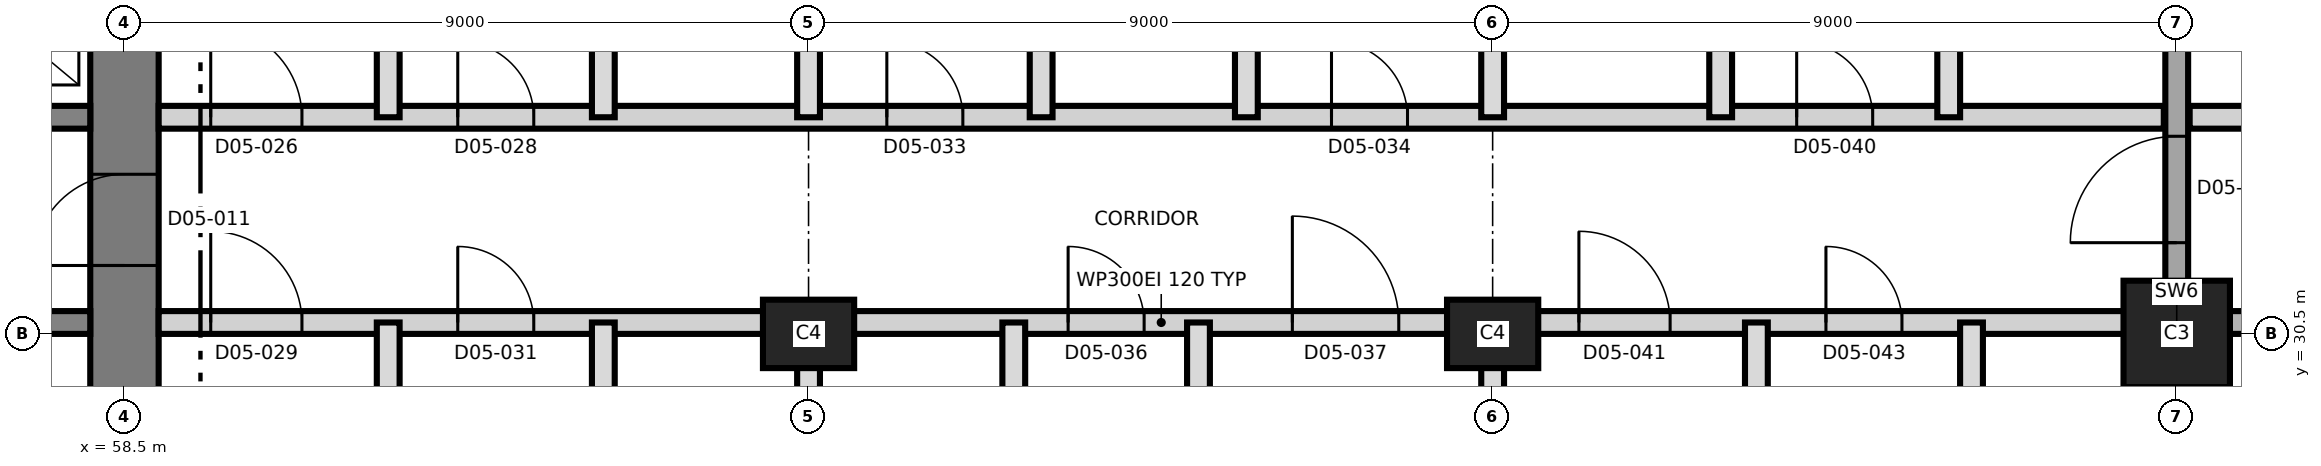
"""IFC4 building model, lengths in metres.
Left out: names, types, materials, properties, quantities, classifications, styles, units other than length and angle.
Written with IfcOpenShell. Run it as: python <this file> out.ifc"""

import sys

from ifc_helpers import new_model, si_unit, direction, frame, frame_2d, origin, origin_2d, place, context, subcontext, project, spatial, rectangle, extrude, element, fill, save


model = new_model("IFC4")
c1 = context("Model", 3, precision=1e-05, world=origin(), true_north=direction((0.0, 1.0)))
c2 = subcontext(c1, "Body", "Model", "MODEL_VIEW")
j1 = project(units=[si_unit("LENGTHUNIT", "METRE"), si_unit("PLANEANGLEUNIT", "RADIAN")], contexts=[c1])
p1 = place(None, origin())
s1 = spatial("IfcSite", under=j1, at=p1, CompositionType="ELEMENT")
p2 = place(p1, origin())
s2 = spatial("IfcBuilding", under=s1, at=p2, CompositionType="ELEMENT")
p3 = place(p2, frame((0.0, 0.0, 74.2)))
s3 = spatial("IfcBuildingStorey", under=s2, at=p3, CompositionType="ELEMENT", Elevation=74.2)
p4 = place(p3, frame((58.5, 21.05, 0.0), z_axis=(0.0, 0.0, 1.0), x_axis=(0.0, 1.0, 0.0)))
e1 = element("IfcWall", 1, at=p4, inside=s3, PredefinedType="SHEAR", context=c2, shape_type="SweptSolid", body=[
    extrude(rectangle(XDim=18.9, YDim=0.9, at=frame_2d((9.45, 0.0))), origin(), (0.0, 0.0, 1.0), 3.7),
])
p5 = place(p4, frame((10.35, 0.0, 0.0)))
e2 = element("IfcOpeningElement", 2, at=p5, cuts=e1, PredefinedType="OPENING", context=c2, shape_type="SweptSolid", body=[
    extrude(rectangle(XDim=1.2, YDim=2.1, at=frame_2d((0.6, 1.05))), frame((0.0, 0.46, 0.0), z_axis=(0.0, -1.0, 0.0), x_axis=(1.0, 0.0, 0.0)), (0.0, 0.0, 1.0), 0.92),
])
p6 = place(p3, frame((31.95, 30.65, 0.0), z_axis=(0.0, 0.0, 1.0), x_axis=(1.0, 0.0, 0.0)))
e3 = element("IfcWall", 3, at=p6, inside=s3, PredefinedType="SHEAR", context=c2, shape_type="SweptSolid", body=[
    extrude(rectangle(XDim=26.1, YDim=0.3, at=frame_2d((13.05, 0.0))), origin(), (0.0, 0.0, 1.0), 3.7),
])
p7 = place(p6, frame((24.55, 0.0, 0.0)))
e4 = element("IfcOpeningElement", 4, at=p7, cuts=e3, PredefinedType="OPENING", context=c2, shape_type="SweptSolid", body=[
    extrude(rectangle(XDim=1.0, YDim=2.1, at=frame_2d((0.5, 1.05))), frame((0.0, 0.16, 0.0), z_axis=(0.0, -1.0, 0.0), x_axis=(1.0, 0.0, 0.0)), (0.0, 0.0, 1.0), 0.32),
])
p8 = place(p6, frame((11.35, 0.0, 0.0)))
e5 = element("IfcOpeningElement", 5, at=p8, cuts=e3, PredefinedType="OPENING", context=c2, shape_type="SweptSolid", body=[
    extrude(rectangle(XDim=1.0, YDim=2.1, at=frame_2d((0.5, 1.05))), frame((0.0, 0.16, 0.0), z_axis=(0.0, -1.0, 0.0), x_axis=(1.0, 0.0, 0.0)), (0.0, 0.0, 1.0), 0.32),
])
p9 = place(p3, frame((31.95, 33.35, 0.0), z_axis=(0.0, 0.0, 1.0), x_axis=(1.0, 0.0, 0.0)))
e6 = element("IfcWall", 6, at=p9, inside=s3, PredefinedType="SHEAR", context=c2, shape_type="SweptSolid", body=[
    extrude(rectangle(XDim=26.1, YDim=0.3, at=frame_2d((13.05, 0.0))), origin(), (0.0, 0.0, 1.0), 3.7),
])
p10 = place(p9, frame((13.7, 0.0, 0.0)))
e7 = element("IfcOpeningElement", 7, at=p10, cuts=e6, PredefinedType="OPENING", context=c2, shape_type="SweptSolid", body=[
    extrude(rectangle(XDim=1.4, YDim=2.1, at=frame_2d((0.7, 1.05))), frame((0.0, 0.16, 0.0), z_axis=(0.0, -1.0, 0.0), x_axis=(1.0, 0.0, 0.0)), (0.0, 0.0, 1.0), 0.32),
])
p11 = place(p9, frame((5.175, 0.0, 0.0)))
e8 = element("IfcOpeningElement", 8, at=p11, cuts=e6, PredefinedType="OPENING", context=c2, shape_type="SweptSolid", body=[
    extrude(rectangle(XDim=1.2, YDim=2.1, at=frame_2d((0.6, 1.05))), frame((0.0, 0.16, 0.0), z_axis=(0.0, -1.0, 0.0), x_axis=(1.0, 0.0, 0.0)), (0.0, 0.0, 1.0), 0.32),
])
p12 = place(p9, frame((19.725, 0.0, 0.0)))
e9 = element("IfcOpeningElement", 9, at=p12, cuts=e6, PredefinedType="OPENING", context=c2, shape_type="SweptSolid", body=[
    extrude(rectangle(XDim=1.2, YDim=2.1, at=frame_2d((0.6, 1.05))), frame((0.0, 0.16, 0.0), z_axis=(0.0, -1.0, 0.0), x_axis=(1.0, 0.0, 0.0)), (0.0, 0.0, 1.0), 0.32),
])
for number, where, z_axis, x_axis in (
    (10, (67.5, 30.5, 0.0), (0.0, 0.0, 1.0), (1.0, 0.0, 0.0)),
    (11, (76.5, 30.5, 0.0), (0.0, 0.0, 1.0), (1.0, 0.0, 0.0)),
):
    element("IfcColumn", number, at=place(p3, frame(where, z_axis=z_axis, x_axis=x_axis)), inside=s3, PredefinedType="COLUMN", context=c2, shape_type="SweptSolid", body=[
        extrude(rectangle(XDim=1.2, YDim=0.9, at=origin_2d()), origin(), (0.0, 0.0, 1.0), 3.7),
    ])
p13 = place(p3, frame((85.5, 30.5, 0.0), z_axis=(0.0, 0.0, 1.0), x_axis=(1.0, 0.0, 0.0)))
e12 = element("IfcColumn", 12, at=p13, inside=s3, PredefinedType="COLUMN", context=c2, shape_type="SweptSolid", body=[
    extrude(rectangle(XDim=1.4, YDim=1.4, at=origin_2d()), origin(), (0.0, 0.0, 1.0), 3.7),
])
p14 = place(p3, frame((85.5, 20.35, 0.0), z_axis=(0.0, 0.0, 1.0), x_axis=(0.0, 1.0, 0.0)))
e13 = element("IfcWall", 13, at=p14, inside=s3, PredefinedType="SHEAR", context=c2, shape_type="SweptSolid", body=[
    extrude(rectangle(XDim=20.3, YDim=0.3, at=frame_2d((10.15, 0.0))), origin(), (0.0, 0.0, 1.0), 3.7),
])
p15 = place(p14, frame((11.35, 0.0, 0.0)))
e14 = element("IfcOpeningElement", 14, at=p15, cuts=e13, PredefinedType="OPENING", context=c2, shape_type="SweptSolid", body=[
    extrude(rectangle(XDim=1.4, YDim=2.1, at=frame_2d((0.7, 1.05))), frame((0.0, 0.16, 0.0), z_axis=(0.0, -1.0, 0.0), x_axis=(1.0, 0.0, 0.0)), (0.0, 0.0, 1.0), 0.32),
])
p16 = place(p3, frame((58.95, 30.65, 0.0), z_axis=(0.0, 0.0, 1.0), x_axis=(1.0, 0.0, 0.0)))
e15 = element("IfcWall", 15, at=p16, inside=s3, PredefinedType="PARTITIONING", context=c2, shape_type="SweptSolid", body=[
    extrude(rectangle(XDim=26.38, YDim=0.3, at=frame_2d((13.19, 0.0))), origin(), (0.0, 0.0, 1.0), 3.4),
])
p17 = place(p16, frame((0.685, 0.0, 0.0)))
e16 = element("IfcOpeningElement", 16, at=p17, cuts=e15, PredefinedType="OPENING", context=c2, shape_type="SweptSolid", body=[
    extrude(rectangle(XDim=1.2, YDim=2.1, at=frame_2d((0.6, 1.05))), frame((0.0, 0.16, 0.0), z_axis=(0.0, -1.0, 0.0), x_axis=(1.0, 0.0, 0.0)), (0.0, 0.0, 1.0), 0.32),
])
p18 = place(p16, frame((3.935, 0.0, 0.0)))
e17 = element("IfcOpeningElement", 17, at=p18, cuts=e15, PredefinedType="OPENING", context=c2, shape_type="SweptSolid", body=[
    extrude(rectangle(XDim=1.0, YDim=2.1, at=frame_2d((0.5, 1.05))), frame((0.0, 0.16, 0.0), z_axis=(0.0, -1.0, 0.0), x_axis=(1.0, 0.0, 0.0)), (0.0, 0.0, 1.0), 0.32),
])
p19 = place(p16, frame((11.965, 0.0, 0.0)))
e18 = element("IfcOpeningElement", 18, at=p19, cuts=e15, PredefinedType="OPENING", context=c2, shape_type="SweptSolid", body=[
    extrude(rectangle(XDim=1.0, YDim=2.1, at=frame_2d((0.5, 1.05))), frame((0.0, 0.16, 0.0), z_axis=(0.0, -1.0, 0.0), x_axis=(1.0, 0.0, 0.0)), (0.0, 0.0, 1.0), 0.32),
])
p20 = place(p16, frame((14.915, 0.0, 0.0)))
e19 = element("IfcOpeningElement", 19, at=p20, cuts=e15, PredefinedType="OPENING", context=c2, shape_type="SweptSolid", body=[
    extrude(rectangle(XDim=1.4, YDim=2.1, at=frame_2d((0.7, 1.05))), frame((0.0, 0.16, 0.0), z_axis=(0.0, -1.0, 0.0), x_axis=(1.0, 0.0, 0.0)), (0.0, 0.0, 1.0), 0.32),
])
p21 = place(p16, frame((18.685, 0.0, 0.0)))
e20 = element("IfcOpeningElement", 20, at=p21, cuts=e15, PredefinedType="OPENING", context=c2, shape_type="SweptSolid", body=[
    extrude(rectangle(XDim=1.2, YDim=2.1, at=frame_2d((0.6, 1.05))), frame((0.0, 0.16, 0.0), z_axis=(0.0, -1.0, 0.0), x_axis=(1.0, 0.0, 0.0)), (0.0, 0.0, 1.0), 0.32),
])
p22 = place(p16, frame((21.935, 0.0, 0.0)))
e21 = element("IfcOpeningElement", 21, at=p22, cuts=e15, PredefinedType="OPENING", context=c2, shape_type="SweptSolid", body=[
    extrude(rectangle(XDim=1.0, YDim=2.1, at=frame_2d((0.5, 1.05))), frame((0.0, 0.16, 0.0), z_axis=(0.0, -1.0, 0.0), x_axis=(1.0, 0.0, 0.0)), (0.0, 0.0, 1.0), 0.32),
])
p23 = place(p3, frame((85.67, 30.65, 0.0), z_axis=(0.0, 0.0, 1.0), x_axis=(1.0, 0.0, 0.0)))
e22 = element("IfcWall", 22, at=p23, inside=s3, PredefinedType="SHEAR", context=c2, shape_type="SweptSolid", body=[
    extrude(rectangle(XDim=9.58, YDim=0.3, at=frame_2d((4.79, 0.0))), origin(), (0.0, 0.0, 1.0), 3.4),
])
p24 = place(p23, frame((2.08, 0.0, 0.0)))
e23 = element("IfcOpeningElement", 23, at=p24, cuts=e22, PredefinedType="OPENING", context=c2, shape_type="SweptSolid", body=[
    extrude(rectangle(XDim=1.2, YDim=2.1, at=frame_2d((0.6, 1.05))), frame((0.0, 0.16, 0.0), z_axis=(0.0, -1.0, 0.0), x_axis=(1.0, 0.0, 0.0)), (0.0, 0.0, 1.0), 0.32),
])
p25 = place(p23, frame((5.63, 0.0, 0.0)))
e24 = element("IfcOpeningElement", 24, at=p25, cuts=e22, PredefinedType="OPENING", context=c2, shape_type="SweptSolid", body=[
    extrude(rectangle(XDim=1.0, YDim=2.1, at=frame_2d((0.5, 1.05))), frame((0.0, 0.16, 0.0), z_axis=(0.0, -1.0, 0.0), x_axis=(1.0, 0.0, 0.0)), (0.0, 0.0, 1.0), 0.32),
])
p26 = place(p3, frame((58.95, 33.35, 0.0), z_axis=(0.0, 0.0, 1.0), x_axis=(1.0, 0.0, 0.0)))
e25 = element("IfcWall", 25, at=p26, inside=s3, PredefinedType="PARTITIONING", context=c2, shape_type="SweptSolid", body=[
    extrude(rectangle(XDim=26.38, YDim=0.3, at=frame_2d((13.19, 0.0))), origin(), (0.0, 0.0, 1.0), 3.4),
])
p27 = place(p26, frame((0.685, 0.0, 0.0)))
e26 = element("IfcOpeningElement", 26, at=p27, cuts=e25, PredefinedType="OPENING", context=c2, shape_type="SweptSolid", body=[
    extrude(rectangle(XDim=1.2, YDim=2.1, at=frame_2d((0.6, 1.05))), frame((0.0, 0.16, 0.0), z_axis=(0.0, -1.0, 0.0), x_axis=(1.0, 0.0, 0.0)), (0.0, 0.0, 1.0), 0.32),
])
p28 = place(p26, frame((3.935, 0.0, 0.0)))
e27 = element("IfcOpeningElement", 27, at=p28, cuts=e25, PredefinedType="OPENING", context=c2, shape_type="SweptSolid", body=[
    extrude(rectangle(XDim=1.0, YDim=2.1, at=frame_2d((0.5, 1.05))), frame((0.0, 0.16, 0.0), z_axis=(0.0, -1.0, 0.0), x_axis=(1.0, 0.0, 0.0)), (0.0, 0.0, 1.0), 0.32),
])
p29 = place(p26, frame((9.58, 0.0, 0.0)))
e28 = element("IfcOpeningElement", 28, at=p29, cuts=e25, PredefinedType="OPENING", context=c2, shape_type="SweptSolid", body=[
    extrude(rectangle(XDim=1.0, YDim=2.1, at=frame_2d((0.5, 1.05))), frame((0.0, 0.16, 0.0), z_axis=(0.0, -1.0, 0.0), x_axis=(1.0, 0.0, 0.0)), (0.0, 0.0, 1.0), 0.32),
])
p30 = place(p26, frame((15.43, 0.0, 0.0)))
e29 = element("IfcOpeningElement", 29, at=p30, cuts=e25, PredefinedType="OPENING", context=c2, shape_type="SweptSolid", body=[
    extrude(rectangle(XDim=1.0, YDim=2.1, at=frame_2d((0.5, 1.05))), frame((0.0, 0.16, 0.0), z_axis=(0.0, -1.0, 0.0), x_axis=(1.0, 0.0, 0.0)), (0.0, 0.0, 1.0), 0.32),
])
p31 = place(p26, frame((21.55, 0.0, 0.0)))
e30 = element("IfcOpeningElement", 30, at=p31, cuts=e25, PredefinedType="OPENING", context=c2, shape_type="SweptSolid", body=[
    extrude(rectangle(XDim=1.0, YDim=2.4, at=frame_2d((0.5, 1.2))), frame((0.0, 0.16, 0.0), z_axis=(0.0, -1.0, 0.0), x_axis=(1.0, 0.0, 0.0)), (0.0, 0.0, 1.0), 0.32),
])
p32 = place(p3, frame((85.67, 33.35, 0.0), z_axis=(0.0, 0.0, 1.0), x_axis=(1.0, 0.0, 0.0)))
e31 = element("IfcWall", 31, at=p32, inside=s3, PredefinedType="PARTITIONING", context=c2, shape_type="SweptSolid", body=[
    extrude(rectangle(XDim=9.58, YDim=0.3, at=frame_2d((4.79, 0.0))), origin(), (0.0, 0.0, 1.0), 3.4),
])
p33 = place(p32, frame((1.83, 0.0, 0.0)))
e32 = element("IfcOpeningElement", 32, at=p33, cuts=e31, PredefinedType="OPENING", context=c2, shape_type="SweptSolid", body=[
    extrude(rectangle(XDim=1.0, YDim=2.1, at=frame_2d((0.5, 1.05))), frame((0.0, 0.16, 0.0), z_axis=(0.0, -1.0, 0.0), x_axis=(1.0, 0.0, 0.0)), (0.0, 0.0, 1.0), 0.32),
])
p34 = place(p32, frame((5.63, 0.0, 0.0)))
e33 = element("IfcOpeningElement", 33, at=p34, cuts=e31, PredefinedType="OPENING", context=c2, shape_type="SweptSolid", body=[
    extrude(rectangle(XDim=1.0, YDim=2.1, at=frame_2d((0.5, 1.05))), frame((0.0, 0.16, 0.0), z_axis=(0.0, -1.0, 0.0), x_axis=(1.0, 0.0, 0.0)), (0.0, 0.0, 1.0), 0.32),
])
p35 = place(p3, frame((61.97, 20.35, 0.0), z_axis=(0.0, 0.0, 1.0), x_axis=(0.0, 1.0, 0.0)))
e34 = element("IfcWall", 34, at=p35, inside=s3, PredefinedType="PARTITIONING", context=c2, shape_type="SweptSolid", body=[
    extrude(rectangle(XDim=10.3, YDim=0.3, at=frame_2d((5.15, 0.0))), origin(), (0.0, 0.0, 1.0), 3.4),
])
p36 = place(p3, frame((61.97, 33.35, 0.0), z_axis=(0.0, 0.0, 1.0), x_axis=(0.0, 1.0, 0.0)))
e35 = element("IfcWall", 35, at=p36, inside=s3, PredefinedType="PARTITIONING", context=c2, shape_type="SweptSolid", body=[
    extrude(rectangle(XDim=7.44, YDim=0.3, at=frame_2d((3.72, 0.0))), origin(), (0.0, 0.0, 1.0), 3.4),
])
for number, where, z_axis, x_axis in (
    (36, (64.8, 27.45, 0.0), (0.0, 0.0, 1.0), (0.0, 1.0, 0.0)),
    (37, (64.8, 33.35, 0.0), (0.0, 0.0, 1.0), (0.0, 1.0, 0.0)),
):
    element("IfcWall", number, at=place(p3, frame(where, z_axis=z_axis, x_axis=x_axis)), inside=s3, PredefinedType="PARTITIONING", context=c2, shape_type="SweptSolid", body=[
        extrude(rectangle(XDim=3.2, YDim=0.3, at=frame_2d((1.6, 0.0))), origin(), (0.0, 0.0, 1.0), 3.4),
    ])
p37 = place(p3, frame((67.5, 20.35, 0.0), z_axis=(0.0, 0.0, 1.0), x_axis=(0.0, 1.0, 0.0)))
e38 = element("IfcWall", 38, at=p37, inside=s3, PredefinedType="PARTITIONING", context=c2, shape_type="SweptSolid", body=[
    extrude(rectangle(XDim=10.3, YDim=0.3, at=frame_2d((5.15, 0.0))), origin(), (0.0, 0.0, 1.0), 3.4),
])
p38 = place(p3, frame((67.5, 33.35, 0.0), z_axis=(0.0, 0.0, 1.0), x_axis=(0.0, 1.0, 0.0)))
e39 = element("IfcWall", 39, at=p38, inside=s3, PredefinedType="PARTITIONING", context=c2, shape_type="SweptSolid", body=[
    extrude(rectangle(XDim=7.48, YDim=0.3, at=frame_2d((3.74, 0.0))), origin(), (0.0, 0.0, 1.0), 3.4),
])
for number, where, z_axis, x_axis in (
    (40, (70.2, 27.45, 0.0), (0.0, 0.0, 1.0), (0.0, 1.0, 0.0)),
    (41, (70.56, 33.35, 0.0), (0.0, 0.0, 1.0), (0.0, 1.0, 0.0)),
):
    element("IfcWall", number, at=place(p3, frame(where, z_axis=z_axis, x_axis=x_axis)), inside=s3, PredefinedType="PARTITIONING", context=c2, shape_type="SweptSolid", body=[
        extrude(rectangle(XDim=3.2, YDim=0.3, at=frame_2d((1.6, 0.0))), origin(), (0.0, 0.0, 1.0), 3.4),
    ])
p39 = place(p3, frame((72.63, 20.35, 0.0), z_axis=(0.0, 0.0, 1.0), x_axis=(0.0, 1.0, 0.0)))
e42 = element("IfcWall", 42, at=p39, inside=s3, PredefinedType="PARTITIONING", context=c2, shape_type="SweptSolid", body=[
    extrude(rectangle(XDim=10.3, YDim=0.3, at=frame_2d((5.15, 0.0))), origin(), (0.0, 0.0, 1.0), 3.4),
])
p40 = place(p3, frame((73.26, 33.35, 0.0), z_axis=(0.0, 0.0, 1.0), x_axis=(0.0, 1.0, 0.0)))
e43 = element("IfcWall", 43, at=p40, inside=s3, PredefinedType="PARTITIONING", context=c2, shape_type="SweptSolid", body=[
    extrude(rectangle(XDim=7.48, YDim=0.3, at=frame_2d((3.74, 0.0))), origin(), (0.0, 0.0, 1.0), 3.4),
])
p41 = place(p3, frame((76.5, 20.35, 0.0), z_axis=(0.0, 0.0, 1.0), x_axis=(0.0, 1.0, 0.0)))
e44 = element("IfcWall", 44, at=p41, inside=s3, PredefinedType="PARTITIONING", context=c2, shape_type="SweptSolid", body=[
    extrude(rectangle(XDim=10.3, YDim=0.3, at=frame_2d((5.15, 0.0))), origin(), (0.0, 0.0, 1.0), 3.4),
])
p42 = place(p3, frame((76.5, 33.35, 0.0), z_axis=(0.0, 0.0, 1.0), x_axis=(0.0, 1.0, 0.0)))
e45 = element("IfcWall", 45, at=p42, inside=s3, PredefinedType="PARTITIONING", context=c2, shape_type="SweptSolid", body=[
    extrude(rectangle(XDim=7.48, YDim=0.3, at=frame_2d((3.74, 0.0))), origin(), (0.0, 0.0, 1.0), 3.4),
])
p43 = place(p3, frame((79.5, 33.35, 0.0), z_axis=(0.0, 0.0, 1.0), x_axis=(0.0, 1.0, 0.0)))
e46 = element("IfcWall", 46, at=p43, inside=s3, PredefinedType="PARTITIONING", context=c2, shape_type="SweptSolid", body=[
    extrude(rectangle(XDim=3.3, YDim=0.3, at=frame_2d((1.65, 0.0))), origin(), (0.0, 0.0, 1.0), 3.4),
])
p44 = place(p3, frame((79.97, 20.35, 0.0), z_axis=(0.0, 0.0, 1.0), x_axis=(0.0, 1.0, 0.0)))
e47 = element("IfcWall", 47, at=p44, inside=s3, PredefinedType="PARTITIONING", context=c2, shape_type="SweptSolid", body=[
    extrude(rectangle(XDim=10.3, YDim=0.3, at=frame_2d((5.15, 0.0))), origin(), (0.0, 0.0, 1.0), 3.4),
])
p45 = place(p3, frame((82.5, 33.35, 0.0), z_axis=(0.0, 0.0, 1.0), x_axis=(0.0, 1.0, 0.0)))
e48 = element("IfcWall", 48, at=p45, inside=s3, PredefinedType="PARTITIONING", context=c2, shape_type="SweptSolid", body=[
    extrude(rectangle(XDim=3.3, YDim=0.3, at=frame_2d((1.65, 0.0))), origin(), (0.0, 0.0, 1.0), 3.4),
])
p46 = place(p3, frame((82.8, 27.45, 0.0), z_axis=(0.0, 0.0, 1.0), x_axis=(0.0, 1.0, 0.0)))
e49 = element("IfcWall", 49, at=p46, inside=s3, PredefinedType="PARTITIONING", context=c2, shape_type="SweptSolid", body=[
    extrude(rectangle(XDim=3.2, YDim=0.3, at=frame_2d((1.6, 0.0))), origin(), (0.0, 0.0, 1.0), 3.4),
])
p47 = place(p5, origin())
e50 = element("IfcDoor", 50, at=p47, inside=s3, OperationType="SINGLE_SWING_LEFT", PredefinedType="DOOR", context=c2, shape_type="SweptSolid", body=[
    extrude(rectangle(XDim=1.2, YDim=2.1, at=frame_2d((0.6, 1.05))), frame((0.0, 0.025, 0.0), z_axis=(0.0, -1.0, 0.0), x_axis=(1.0, 0.0, 0.0)), (0.0, 0.0, 1.0), 0.05),
])
fill(e2, e50)
p48 = place(p27, origin())
e51 = element("IfcDoor", 51, at=p48, inside=s3, OperationType="SINGLE_SWING_LEFT", PredefinedType="DOOR", context=c2, shape_type="SweptSolid", body=[
    extrude(rectangle(XDim=1.2, YDim=2.1, at=frame_2d((0.6, 1.05))), frame((0.0, 0.025, 0.0), z_axis=(0.0, -1.0, 0.0), x_axis=(1.0, 0.0, 0.0)), (0.0, 0.0, 1.0), 0.05),
])
fill(e26, e51)
p49 = place(p28, origin())
e52 = element("IfcDoor", 52, at=p49, inside=s3, OperationType="SINGLE_SWING_LEFT", PredefinedType="DOOR", context=c2, shape_type="SweptSolid", body=[
    extrude(rectangle(XDim=1.0, YDim=2.1, at=frame_2d((0.5, 1.05))), frame((0.0, 0.025, 0.0), z_axis=(0.0, -1.0, 0.0), x_axis=(1.0, 0.0, 0.0)), (0.0, 0.0, 1.0), 0.05),
])
fill(e27, e52)
p50 = place(p17, origin())
e53 = element("IfcDoor", 53, at=p50, inside=s3, OperationType="SINGLE_SWING_LEFT", PredefinedType="DOOR", context=c2, shape_type="SweptSolid", body=[
    extrude(rectangle(XDim=1.2, YDim=2.1, at=frame_2d((0.6, 1.05))), frame((0.0, 0.025, 0.0), z_axis=(0.0, -1.0, 0.0), x_axis=(1.0, 0.0, 0.0)), (0.0, 0.0, 1.0), 0.05),
])
fill(e16, e53)
p51 = place(p18, origin())
e54 = element("IfcDoor", 54, at=p51, inside=s3, OperationType="SINGLE_SWING_LEFT", PredefinedType="DOOR", context=c2, shape_type="SweptSolid", body=[
    extrude(rectangle(XDim=1.0, YDim=2.1, at=frame_2d((0.5, 1.05))), frame((0.0, 0.025, 0.0), z_axis=(0.0, -1.0, 0.0), x_axis=(1.0, 0.0, 0.0)), (0.0, 0.0, 1.0), 0.05),
])
fill(e17, e54)
p52 = place(p29, origin())
e55 = element("IfcDoor", 55, at=p52, inside=s3, OperationType="SINGLE_SWING_LEFT", PredefinedType="DOOR", context=c2, shape_type="SweptSolid", body=[
    extrude(rectangle(XDim=1.0, YDim=2.1, at=frame_2d((0.5, 1.05))), frame((0.0, 0.025, 0.0), z_axis=(0.0, -1.0, 0.0), x_axis=(1.0, 0.0, 0.0)), (0.0, 0.0, 1.0), 0.05),
])
fill(e28, e55)
p53 = place(p30, origin())
e56 = element("IfcDoor", 56, at=p53, inside=s3, OperationType="SINGLE_SWING_RIGHT", PredefinedType="DOOR", context=c2, shape_type="SweptSolid", body=[
    extrude(rectangle(XDim=1.0, YDim=2.1, at=frame_2d((0.5, 1.05))), frame((0.0, 0.025, 0.0), z_axis=(0.0, -1.0, 0.0), x_axis=(1.0, 0.0, 0.0)), (0.0, 0.0, 1.0), 0.05),
])
fill(e29, e56)
p54 = place(p19, origin())
e57 = element("IfcDoor", 57, at=p54, inside=s3, OperationType="SINGLE_SWING_LEFT", PredefinedType="DOOR", context=c2, shape_type="SweptSolid", body=[
    extrude(rectangle(XDim=1.0, YDim=2.1, at=frame_2d((0.5, 1.05))), frame((0.0, 0.025, 0.0), z_axis=(0.0, -1.0, 0.0), x_axis=(1.0, 0.0, 0.0)), (0.0, 0.0, 1.0), 0.05),
])
fill(e18, e57)
p55 = place(p20, origin())
e58 = element("IfcDoor", 58, at=p55, inside=s3, OperationType="SINGLE_SWING_RIGHT", PredefinedType="DOOR", context=c2, shape_type="SweptSolid", body=[
    extrude(rectangle(XDim=1.4, YDim=2.1, at=frame_2d((0.7, 1.05))), frame((0.0, 0.025, 0.0), z_axis=(0.0, -1.0, 0.0), x_axis=(1.0, 0.0, 0.0)), (0.0, 0.0, 1.0), 0.05),
])
fill(e19, e58)
p56 = place(p31, origin())
e59 = element("IfcDoor", 59, at=p56, inside=s3, OperationType="SINGLE_SWING_LEFT", PredefinedType="DOOR", context=c2, shape_type="SweptSolid", body=[
    extrude(rectangle(XDim=1.0, YDim=2.4, at=frame_2d((0.5, 1.2))), frame((0.0, 0.025, 0.0), z_axis=(0.0, -1.0, 0.0), x_axis=(1.0, 0.0, 0.0)), (0.0, 0.0, 1.0), 0.05),
])
fill(e30, e59)
p57 = place(p21, origin())
e60 = element("IfcDoor", 60, at=p57, inside=s3, OperationType="SINGLE_SWING_LEFT", PredefinedType="DOOR", context=c2, shape_type="SweptSolid", body=[
    extrude(rectangle(XDim=1.2, YDim=2.1, at=frame_2d((0.6, 1.05))), frame((0.0, 0.025, 0.0), z_axis=(0.0, -1.0, 0.0), x_axis=(1.0, 0.0, 0.0)), (0.0, 0.0, 1.0), 0.05),
])
fill(e20, e60)
p58 = place(p22, origin())
e61 = element("IfcDoor", 61, at=p58, inside=s3, OperationType="SINGLE_SWING_LEFT", PredefinedType="DOOR", context=c2, shape_type="SweptSolid", body=[
    extrude(rectangle(XDim=1.0, YDim=2.1, at=frame_2d((0.5, 1.05))), frame((0.0, 0.025, 0.0), z_axis=(0.0, -1.0, 0.0), x_axis=(1.0, 0.0, 0.0)), (0.0, 0.0, 1.0), 0.05),
])
fill(e21, e61)
p59 = place(p15, origin())
e62 = element("IfcDoor", 62, at=p59, inside=s3, OperationType="SINGLE_SWING_RIGHT", PredefinedType="DOOR", context=c2, shape_type="SweptSolid", body=[
    extrude(rectangle(XDim=1.4, YDim=2.1, at=frame_2d((0.7, 1.05))), frame((0.0, 0.025, 0.0), z_axis=(0.0, -1.0, 0.0), x_axis=(1.0, 0.0, 0.0)), (0.0, 0.0, 1.0), 0.05),
])
fill(e14, e62)
save(model, sys.argv[1])
